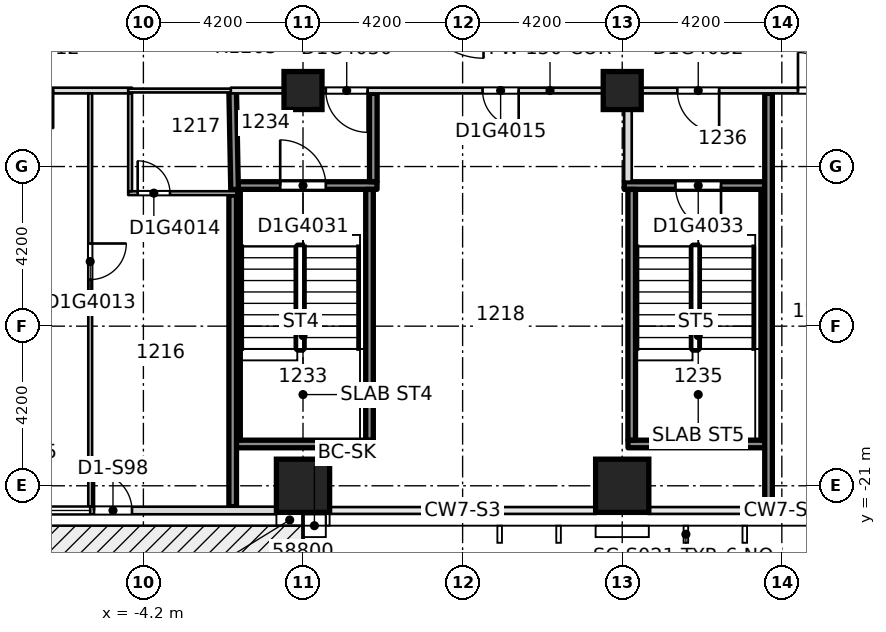
"""IFC4 building model, lengths in metres.
Left out: names, types, materials, properties, quantities, classifications, styles, units other than length and angle.
Written with IfcOpenShell. Run it as: python <this file> out.ifc"""

import sys

from ifc_helpers import new_model, si_unit, direction, frame, frame_2d, origin, origin_2d, place, context, subcontext, project, spatial, rectangle, extrude, element, fill, save


model = new_model("IFC4")
c1 = context("Model", 3, precision=1e-05, world=origin(), true_north=direction((0.0, 1.0)))
c2 = subcontext(c1, "Body", "Model", "MODEL_VIEW")
j1 = project(units=[si_unit("LENGTHUNIT", "METRE"), si_unit("PLANEANGLEUNIT", "RADIAN")], contexts=[c1])
p1 = place(None, origin())
s1 = spatial("IfcSite", under=j1, at=p1, CompositionType="ELEMENT")
p2 = place(p1, origin())
s2 = spatial("IfcBuilding", under=s1, at=p2, CompositionType="ELEMENT")
p3 = place(p2, frame((0.0, 0.0, 55.2)))
s3 = spatial("IfcBuildingStorey", under=s2, at=p3, CompositionType="ELEMENT", Elevation=55.2)
for number, where, z_axis, x_axis in (
    (1, (0.0, -21.0, -0.32), (0.0, 0.0, 1.0), (1.0, 0.0, 0.0)),
    (2, (8.4, -21.0, -0.32), (0.0, 0.0, 1.0), (1.0, 0.0, 0.0)),
):
    element("IfcColumn", number, at=place(p3, frame(where, z_axis=z_axis, x_axis=x_axis)), inside=s3, PredefinedType="COLUMN", context=c2, shape_type="SweptSolid", body=[
        extrude(rectangle(XDim=1.4, YDim=1.4, at=origin_2d()), origin(), (0.0, 0.0, 1.0), 3.45),
    ])
for number, where, z_axis, x_axis in (
    (3, (0.0, -10.6, -0.32), (0.0, 0.0, 1.0), (1.0, 0.0, 0.0)),
    (4, (8.4, -10.6, -0.32), (0.0, 0.0, 1.0), (1.0, 0.0, 0.0)),
):
    element("IfcColumn", number, at=place(p3, frame(where, z_axis=z_axis, x_axis=x_axis)), inside=s3, PredefinedType="COLUMN", context=c2, shape_type="SweptSolid", body=[
        extrude(rectangle(XDim=1.0, YDim=1.0, at=origin_2d()), origin(), (0.0, 0.0, 1.0), 3.45),
    ])
p4 = place(p3, frame((-1.848, -19.9, 0.0), z_axis=(0.0, 0.0, 1.0), x_axis=(1.0, 0.0, 0.0)))
e5 = element("IfcWall", 5, at=p4, inside=s3, PredefinedType="SOLIDWALL", context=c2, shape_type="SweptSolid", body=[
    extrude(rectangle(XDim=3.696, YDim=0.2, at=frame_2d((1.848, 0.0))), origin(), (0.0, 0.0, 1.0), 3.13),
])
p5 = place(p3, frame((8.552, -19.9, 0.0), z_axis=(0.0, 0.0, 1.0), x_axis=(1.0, 0.0, 0.0)))
e6 = element("IfcWall", 6, at=p5, inside=s3, PredefinedType="SOLIDWALL", context=c2, shape_type="SweptSolid", body=[
    extrude(rectangle(XDim=3.696, YDim=0.2, at=frame_2d((1.848, 0.0))), origin(), (0.0, 0.0, 1.0), 3.13),
])
p6 = place(p3, frame((-4.6, -13.3, 0.0), z_axis=(0.0, 0.0, 1.0), x_axis=(1.0, 0.0, 0.0)))
e7 = element("IfcWall", 7, at=p6, inside=s3, PredefinedType="PARTITIONING", context=c2, shape_type="SweptSolid", body=[
    extrude(rectangle(XDim=2.85, YDim=0.1, at=frame_2d((1.425, 0.0))), origin(), (0.0, 0.0, 1.0), 3.13),
])
p7 = place(p6, frame((0.25, 0.0, 0.0)))
e8 = element("IfcOpeningElement", 8, at=p7, cuts=e7, PredefinedType="OPENING", context=c2, shape_type="SweptSolid", body=[
    extrude(rectangle(XDim=0.85, YDim=2.1, at=frame_2d((0.425, 1.05))), frame((0.0, 0.06, 0.0), z_axis=(0.0, -1.0, 0.0), x_axis=(1.0, 0.0, 0.0)), (0.0, 0.0, 1.0), 0.12),
])
p8 = place(p3, frame((-1.798, -13.1, 0.0), z_axis=(0.0, 0.0, 1.0), x_axis=(1.0, 0.0, 0.0)))
e9 = element("IfcWall", 9, at=p8, inside=s3, PredefinedType="SOLIDWALL", context=c2, shape_type="SweptSolid", body=[
    extrude(rectangle(XDim=3.746, YDim=0.2, at=frame_2d((1.873, 0.0))), origin(), (0.0, 0.0, 1.0), 3.13),
])
p9 = place(p8, frame((1.198, 0.0, 0.0)))
e10 = element("IfcOpeningElement", 10, at=p9, cuts=e9, PredefinedType="OPENING", context=c2, shape_type="SweptSolid", body=[
    extrude(rectangle(XDim=1.2, YDim=2.1, at=frame_2d((0.6, 1.05))), frame((0.0, 0.11, 0.0), z_axis=(0.0, -1.0, 0.0), x_axis=(1.0, 0.0, 0.0)), (0.0, 0.0, 1.0), 0.22),
])
p10 = place(p3, frame((8.452, -13.1, 0.0), z_axis=(0.0, 0.0, 1.0), x_axis=(1.0, 0.0, 0.0)))
e11 = element("IfcWall", 11, at=p10, inside=s3, PredefinedType="SOLIDWALL", context=c2, shape_type="SweptSolid", body=[
    extrude(rectangle(XDim=3.696, YDim=0.2, at=frame_2d((1.848, 0.0))), origin(), (0.0, 0.0, 1.0), 3.13),
])
p11 = place(p10, frame((1.348, 0.0, 0.0)))
e12 = element("IfcOpeningElement", 12, at=p11, cuts=e11, PredefinedType="OPENING", context=c2, shape_type="SweptSolid", body=[
    extrude(rectangle(XDim=1.2, YDim=2.1, at=frame_2d((0.6, 1.05))), frame((0.0, 0.11, 0.0), z_axis=(0.0, -1.0, 0.0), x_axis=(1.0, 0.0, 0.0)), (0.0, 0.0, 1.0), 0.22),
])
p12 = place(p3, frame((-14.9, -10.6, 0.0), z_axis=(0.0, 0.0, 1.0), x_axis=(1.0, 0.0, 0.0)))
e13 = element("IfcWall", 13, at=p12, inside=s3, PredefinedType="PARTITIONING", context=c2, shape_type="SweptSolid", body=[
    extrude(rectangle(XDim=10.4, YDim=0.15, at=frame_2d((5.2, 0.0))), origin(), (0.0, 0.0, 1.0), 3.13),
])
p13 = place(p12, frame((7.325, 0.0, 0.0)))
e14 = element("IfcOpeningElement", 14, at=p13, cuts=e13, PredefinedType="OPENING", context=c2, shape_type="SweptSolid", body=[
    extrude(rectangle(XDim=1.0, YDim=2.1, at=frame_2d((0.5, 1.05))), frame((0.0, 0.085, 0.0), z_axis=(0.0, -1.0, 0.0), x_axis=(1.0, 0.0, 0.0)), (0.0, 0.0, 1.0), 0.17),
])
p14 = place(p12, frame((3.95, 0.0, 0.0)))
e15 = element("IfcOpeningElement", 15, at=p14, cuts=e13, PredefinedType="OPENING", context=c2, shape_type="SweptSolid", body=[
    extrude(rectangle(XDim=1.1, YDim=2.1, at=frame_2d((0.55, 1.05))), frame((0.0, 0.085, 0.0), z_axis=(0.0, -1.0, 0.0), x_axis=(1.0, 0.0, 0.0)), (0.0, 0.0, 1.0), 0.17),
])
p15 = place(p12, frame((0.875, 0.0, 0.0)))
e16 = element("IfcOpeningElement", 16, at=p15, cuts=e13, PredefinedType="OPENING", context=c2, shape_type="SweptSolid", body=[
    extrude(rectangle(XDim=1.0, YDim=2.1, at=frame_2d((0.5, 1.05))), frame((0.0, 0.085, 0.0), z_axis=(0.0, -1.0, 0.0), x_axis=(1.0, 0.0, 0.0)), (0.0, 0.0, 1.0), 0.17),
])
p16 = place(p3, frame((-4.6, -10.6, 0.0), z_axis=(0.0, 0.0, 1.0), x_axis=(1.0, 0.0, 0.0)))
e17 = element("IfcWall", 17, at=p16, inside=s3, PredefinedType="PARTITIONING", context=c2, shape_type="SweptSolid", body=[
    extrude(rectangle(XDim=2.8, YDim=0.1, at=frame_2d((1.4, 0.0))), origin(), (0.0, 0.0, 1.0), 3.13),
])
p17 = place(p3, frame((-1.9, -10.6, 0.0), z_axis=(0.0, 0.0, 1.0), x_axis=(1.0, 0.0, 0.0)))
e18 = element("IfcWall", 18, at=p17, inside=s3, PredefinedType="PARTITIONING", context=c2, shape_type="SweptSolid", body=[
    extrude(rectangle(XDim=16.8, YDim=0.15, at=frame_2d((8.4, 0.0))), origin(), (0.0, 0.0, 1.0), 3.13),
])
p18 = place(p17, frame((6.625, 0.0, 0.0)))
e19 = element("IfcOpeningElement", 19, at=p18, cuts=e18, PredefinedType="OPENING", context=c2, shape_type="SweptSolid", body=[
    extrude(rectangle(XDim=0.95, YDim=2.1, at=frame_2d((0.475, 1.05))), frame((0.0, 0.085, 0.0), z_axis=(0.0, -1.0, 0.0), x_axis=(1.0, 0.0, 0.0)), (0.0, 0.0, 1.0), 0.17),
])
p19 = place(p17, frame((2.5, 0.0, 0.0)))
e20 = element("IfcOpeningElement", 20, at=p19, cuts=e18, PredefinedType="OPENING", context=c2, shape_type="SweptSolid", body=[
    extrude(rectangle(XDim=1.1, YDim=2.1, at=frame_2d((0.55, 1.05))), frame((0.0, 0.085, 0.0), z_axis=(0.0, -1.0, 0.0), x_axis=(1.0, 0.0, 0.0)), (0.0, 0.0, 1.0), 0.17),
])
p20 = place(p17, frame((11.75, 0.0, 0.0)))
e21 = element("IfcOpeningElement", 21, at=p20, cuts=e18, PredefinedType="OPENING", context=c2, shape_type="SweptSolid", body=[
    extrude(rectangle(XDim=1.1, YDim=2.1, at=frame_2d((0.55, 1.05))), frame((0.0, 0.085, 0.0), z_axis=(0.0, -1.0, 0.0), x_axis=(1.0, 0.0, 0.0)), (0.0, 0.0, 1.0), 0.17),
])
p21 = place(p17, frame((14.925, 0.0, 0.0)))
e22 = element("IfcOpeningElement", 22, at=p21, cuts=e18, PredefinedType="OPENING", context=c2, shape_type="SweptSolid", body=[
    extrude(rectangle(XDim=1.0, YDim=2.1, at=frame_2d((0.5, 1.05))), frame((0.0, 0.085, 0.0), z_axis=(0.0, -1.0, 0.0), x_axis=(1.0, 0.0, 0.0)), (0.0, 0.0, 1.0), 0.17),
])
p22 = place(p3, frame((-5.6, -21.55, 0.0), z_axis=(0.0, 0.0, 1.0), x_axis=(0.0, 1.0, 0.0)))
e23 = element("IfcWall", 23, at=p22, inside=s3, PredefinedType="PARTITIONING", context=c2, shape_type="SweptSolid", body=[
    extrude(rectangle(XDim=10.875, YDim=0.1, at=frame_2d((5.438, 0.0))), origin(), (0.0, 0.0, 1.0), 3.13),
])
p23 = place(p22, frame((5.975, 0.0, 0.0)))
e24 = element("IfcOpeningElement", 24, at=p23, cuts=e23, PredefinedType="OPENING", context=c2, shape_type="SweptSolid", body=[
    extrude(rectangle(XDim=0.95, YDim=2.1, at=frame_2d((0.475, 1.05))), frame((0.0, 0.06, 0.0), z_axis=(0.0, -1.0, 0.0), x_axis=(1.0, 0.0, 0.0)), (0.0, 0.0, 1.0), 0.12),
])
p24 = place(p3, frame((-4.55, -13.25, 0.0), z_axis=(0.0, 0.0, 1.0), x_axis=(0.0, 1.0, 0.0)))
e25 = element("IfcWall", 25, at=p24, inside=s3, PredefinedType="PARTITIONING", context=c2, shape_type="SweptSolid", body=[
    extrude(rectangle(XDim=2.575, YDim=0.1, at=frame_2d((1.288, 0.0))), origin(), (0.0, 0.0, 1.0), 3.13),
])
p25 = place(p3, frame((-1.8, -13.25, 0.0), z_axis=(0.0, 0.0, 1.0), x_axis=(-0.019062755699, 0.999818289163, 0.0)))
e26 = element("IfcWall", 26, at=p25, inside=s3, PredefinedType="SOLIDWALL", context=c2, shape_type="SweptSolid", body=[
    extrude(rectangle(XDim=2.625, YDim=0.2, at=frame_2d((1.313, 0.0))), origin(), (0.0, 0.0, 1.0), 3.13),
])
for number, where, z_axis, x_axis in (
    (27, (-1.75, -19.798, 0.0), (0.0, 0.0, 1.0), (0.0, 1.0, 0.0)),
    (28, (1.75, -19.798, 0.0), (0.0, 0.0, 1.0), (0.0, 1.0, 0.0)),
):
    element("IfcWall", number, at=place(p3, frame(where, z_axis=z_axis, x_axis=x_axis)), inside=s3, PredefinedType="SOLIDWALL", context=c2, shape_type="SweptSolid", body=[
        extrude(rectangle(XDim=6.596, YDim=0.2, at=frame_2d((3.298, 0.0))), origin(), (0.0, 0.0, 1.0), 3.13),
    ])
p26 = place(p3, frame((1.85, -12.998, 0.0), z_axis=(0.0, 0.0, 1.0), x_axis=(0.0, 1.0, 0.0)))
e29 = element("IfcWall", 29, at=p26, inside=s3, PredefinedType="SOLIDWALL", context=c2, shape_type="SweptSolid", body=[
    extrude(rectangle(XDim=2.323, YDim=0.2, at=frame_2d((1.162, 0.0))), origin(), (0.0, 0.0, 1.0), 3.13),
])
p27 = place(p3, frame((8.55, -12.998, 0.0), z_axis=(0.0, 0.0, 1.0), x_axis=(0.0, 1.0, 0.0)))
e30 = element("IfcWall", 30, at=p27, inside=s3, PredefinedType="PARTITIONING", context=c2, shape_type="SweptSolid", body=[
    extrude(rectangle(XDim=2.323, YDim=0.2, at=frame_2d((1.162, 0.0))), origin(), (0.0, 0.0, 1.0), 3.13),
])
for number, where, z_axis, x_axis in (
    (31, (8.65, -19.798, 0.0), (0.0, 0.0, 1.0), (0.0, 1.0, 0.0)),
    (32, (12.15, -19.798, 0.0), (0.0, 0.0, 1.0), (0.0, 1.0, 0.0)),
):
    element("IfcWall", number, at=place(p3, frame(where, z_axis=z_axis, x_axis=x_axis)), inside=s3, PredefinedType="SOLIDWALL", context=c2, shape_type="SweptSolid", body=[
        extrude(rectangle(XDim=6.596, YDim=0.2, at=frame_2d((3.298, 0.0))), origin(), (0.0, 0.0, 1.0), 3.13),
    ])
p28 = place(p3, frame((-7.7, -21.65, 0.0), z_axis=(0.0, 0.0, 1.0), x_axis=(1.0, 0.0, 0.0)))
e33 = element("IfcWall", 33, at=p28, inside=s3, PredefinedType="STANDARD", context=c2, shape_type="SweptSolid", body=[
    extrude(rectangle(XDim=7.0, YDim=0.2, at=frame_2d((3.5, 0.0))), origin(), (0.0, 0.0, 1.0), 3.13),
])
p29 = place(p28, frame((0.3, 0.0, 0.2)))
e34 = element("IfcOpeningElement", 34, at=p29, cuts=e33, PredefinedType="OPENING", context=c2, shape_type="SweptSolid", body=[
    extrude(rectangle(XDim=1.8, YDim=2.65, at=frame_2d((0.9, 1.325))), frame((0.0, 0.11, 0.0), z_axis=(0.0, -1.0, 0.0), x_axis=(1.0, 0.0, 0.0)), (0.0, 0.0, 1.0), 0.22),
])
p30 = place(p28, frame((2.2, 0.0, 0.0)))
e35 = element("IfcOpeningElement", 35, at=p30, cuts=e33, PredefinedType="OPENING", context=c2, shape_type="SweptSolid", body=[
    extrude(rectangle(XDim=1.0, YDim=2.4, at=frame_2d((0.5, 1.2))), frame((0.0, 0.11, 0.0), z_axis=(0.0, -1.0, 0.0), x_axis=(1.0, 0.0, 0.0)), (0.0, 0.0, 1.0), 0.22),
])
p31 = place(p3, frame((-1.85, -21.55, 0.0), z_axis=(0.0, 0.0, 1.0), x_axis=(0.0, 1.0, 0.0)))
e36 = element("IfcWall", 36, at=p31, inside=s3, PredefinedType="SOLIDWALL", context=c2, shape_type="SweptSolid", body=[
    extrude(rectangle(XDim=8.2, YDim=0.2, at=frame_2d((4.1, 0.0))), origin(), (0.0, 0.0, 1.0), 3.13),
])
p32 = place(p3, frame((12.25, -21.55, 0.0), z_axis=(0.0, 0.0, 1.0), x_axis=(0.0, 1.0, 0.0)))
e37 = element("IfcWall", 37, at=p32, inside=s3, PredefinedType="SOLIDWALL", context=c2, shape_type="SweptSolid", body=[
    extrude(rectangle(XDim=10.875, YDim=0.2, at=frame_2d((5.438, 0.0))), origin(), (0.0, 0.0, 1.0), 3.13),
])
p33 = place(p13, origin())
e38 = element("IfcDoor", 38, at=p33, inside=s3, OperationType="SINGLE_SWING_RIGHT", PredefinedType="DOOR", context=c2, shape_type="SweptSolid", body=[
    extrude(rectangle(XDim=1.0, YDim=2.1, at=frame_2d((0.5, 1.05))), frame((0.0, 0.025, 0.0), z_axis=(0.0, -1.0, 0.0), x_axis=(1.0, 0.0, 0.0)), (0.0, 0.0, 1.0), 0.05),
])
fill(e14, e38)
p34 = place(p23, origin())
e39 = element("IfcDoor", 39, at=p34, inside=s3, OperationType="SINGLE_SWING_LEFT", PredefinedType="DOOR", context=c2, shape_type="SweptSolid", body=[
    extrude(rectangle(XDim=0.95, YDim=2.1, at=frame_2d((0.475, 1.05))), frame((0.0, 0.025, 0.0), z_axis=(0.0, -1.0, 0.0), x_axis=(1.0, 0.0, 0.0)), (0.0, 0.0, 1.0), 0.05),
])
fill(e24, e39)
p35 = place(p7, origin())
e40 = element("IfcDoor", 40, at=p35, inside=s3, OperationType="SINGLE_SWING_LEFT", PredefinedType="DOOR", context=c2, shape_type="SweptSolid", body=[
    extrude(rectangle(XDim=0.85, YDim=2.1, at=frame_2d((0.425, 1.05))), frame((0.0, 0.025, 0.0), z_axis=(0.0, -1.0, 0.0), x_axis=(1.0, 0.0, 0.0)), (0.0, 0.0, 1.0), 0.05),
])
fill(e8, e40)
p36 = place(p18, origin())
e41 = element("IfcDoor", 41, at=p36, inside=s3, OperationType="SINGLE_SWING_RIGHT", PredefinedType="DOOR", context=c2, shape_type="SweptSolid", body=[
    extrude(rectangle(XDim=0.95, YDim=2.1, at=frame_2d((0.475, 1.05))), frame((0.0, 0.025, 0.0), z_axis=(0.0, -1.0, 0.0), x_axis=(1.0, 0.0, 0.0)), (0.0, 0.0, 1.0), 0.05),
])
fill(e19, e41)
p37 = place(p19, origin())
e42 = element("IfcDoor", 42, at=p37, inside=s3, OperationType="SINGLE_SWING_LEFT", PredefinedType="DOOR", context=c2, shape_type="SweptSolid", body=[
    extrude(rectangle(XDim=1.1, YDim=2.1, at=frame_2d((0.55, 1.05))), frame((0.0, 0.025, 0.0), z_axis=(0.0, -1.0, 0.0), x_axis=(1.0, 0.0, 0.0)), (0.0, 0.0, 1.0), 0.05),
])
fill(e20, e42)
p38 = place(p9, origin())
e43 = element("IfcDoor", 43, at=p38, inside=s3, OperationType="SINGLE_SWING_RIGHT", PredefinedType="DOOR", context=c2, shape_type="SweptSolid", body=[
    extrude(rectangle(XDim=1.2, YDim=2.1, at=frame_2d((0.6, 1.05))), frame((0.0, 0.025, 0.0), z_axis=(0.0, -1.0, 0.0), x_axis=(1.0, 0.0, 0.0)), (0.0, 0.0, 1.0), 0.05),
])
fill(e10, e43)
p39 = place(p20, origin())
e44 = element("IfcDoor", 44, at=p39, inside=s3, OperationType="SINGLE_SWING_RIGHT", PredefinedType="DOOR", context=c2, shape_type="SweptSolid", body=[
    extrude(rectangle(XDim=1.1, YDim=2.1, at=frame_2d((0.55, 1.05))), frame((0.0, 0.025, 0.0), z_axis=(0.0, -1.0, 0.0), x_axis=(1.0, 0.0, 0.0)), (0.0, 0.0, 1.0), 0.05),
])
fill(e21, e44)
p40 = place(p11, origin())
e45 = element("IfcDoor", 45, at=p40, inside=s3, OperationType="SINGLE_SWING_RIGHT", PredefinedType="DOOR", context=c2, shape_type="SweptSolid", body=[
    extrude(rectangle(XDim=1.2, YDim=2.1, at=frame_2d((0.6, 1.05))), frame((0.0, 0.025, 0.0), z_axis=(0.0, -1.0, 0.0), x_axis=(1.0, 0.0, 0.0)), (0.0, 0.0, 1.0), 0.05),
])
fill(e12, e45)
p41 = place(p21, origin())
e46 = element("IfcDoor", 46, at=p41, inside=s3, OperationType="SINGLE_SWING_LEFT", PredefinedType="DOOR", context=c2, shape_type="SweptSolid", body=[
    extrude(rectangle(XDim=1.0, YDim=2.1, at=frame_2d((0.5, 1.05))), frame((0.0, 0.025, 0.0), z_axis=(0.0, -1.0, 0.0), x_axis=(1.0, 0.0, 0.0)), (0.0, 0.0, 1.0), 0.05),
])
fill(e22, e46)
p42 = place(p29, origin())
e47 = element("IfcWindow", 47, at=p42, inside=s3, PartitioningType="SINGLE_PANEL", PredefinedType="WINDOW", context=c2, shape_type="SweptSolid", body=[
    extrude(rectangle(XDim=1.8, YDim=2.65, at=frame_2d((0.9, 1.325))), frame((0.0, 0.03, 0.0), z_axis=(0.0, -1.0, 0.0), x_axis=(1.0, 0.0, 0.0)), (0.0, 0.0, 1.0), 0.06),
])
fill(e34, e47)
p43 = place(p30, origin())
e48 = element("IfcDoor", 48, at=p43, inside=s3, OperationType="SINGLE_SWING_LEFT", PredefinedType="DOOR", context=c2, shape_type="SweptSolid", body=[
    extrude(rectangle(XDim=1.0, YDim=2.4, at=frame_2d((0.5, 1.2))), frame((0.0, 0.025, 0.0), z_axis=(0.0, -1.0, 0.0), x_axis=(1.0, 0.0, 0.0)), (0.0, 0.0, 1.0), 0.05),
])
fill(e35, e48)
save(model, sys.argv[1])
